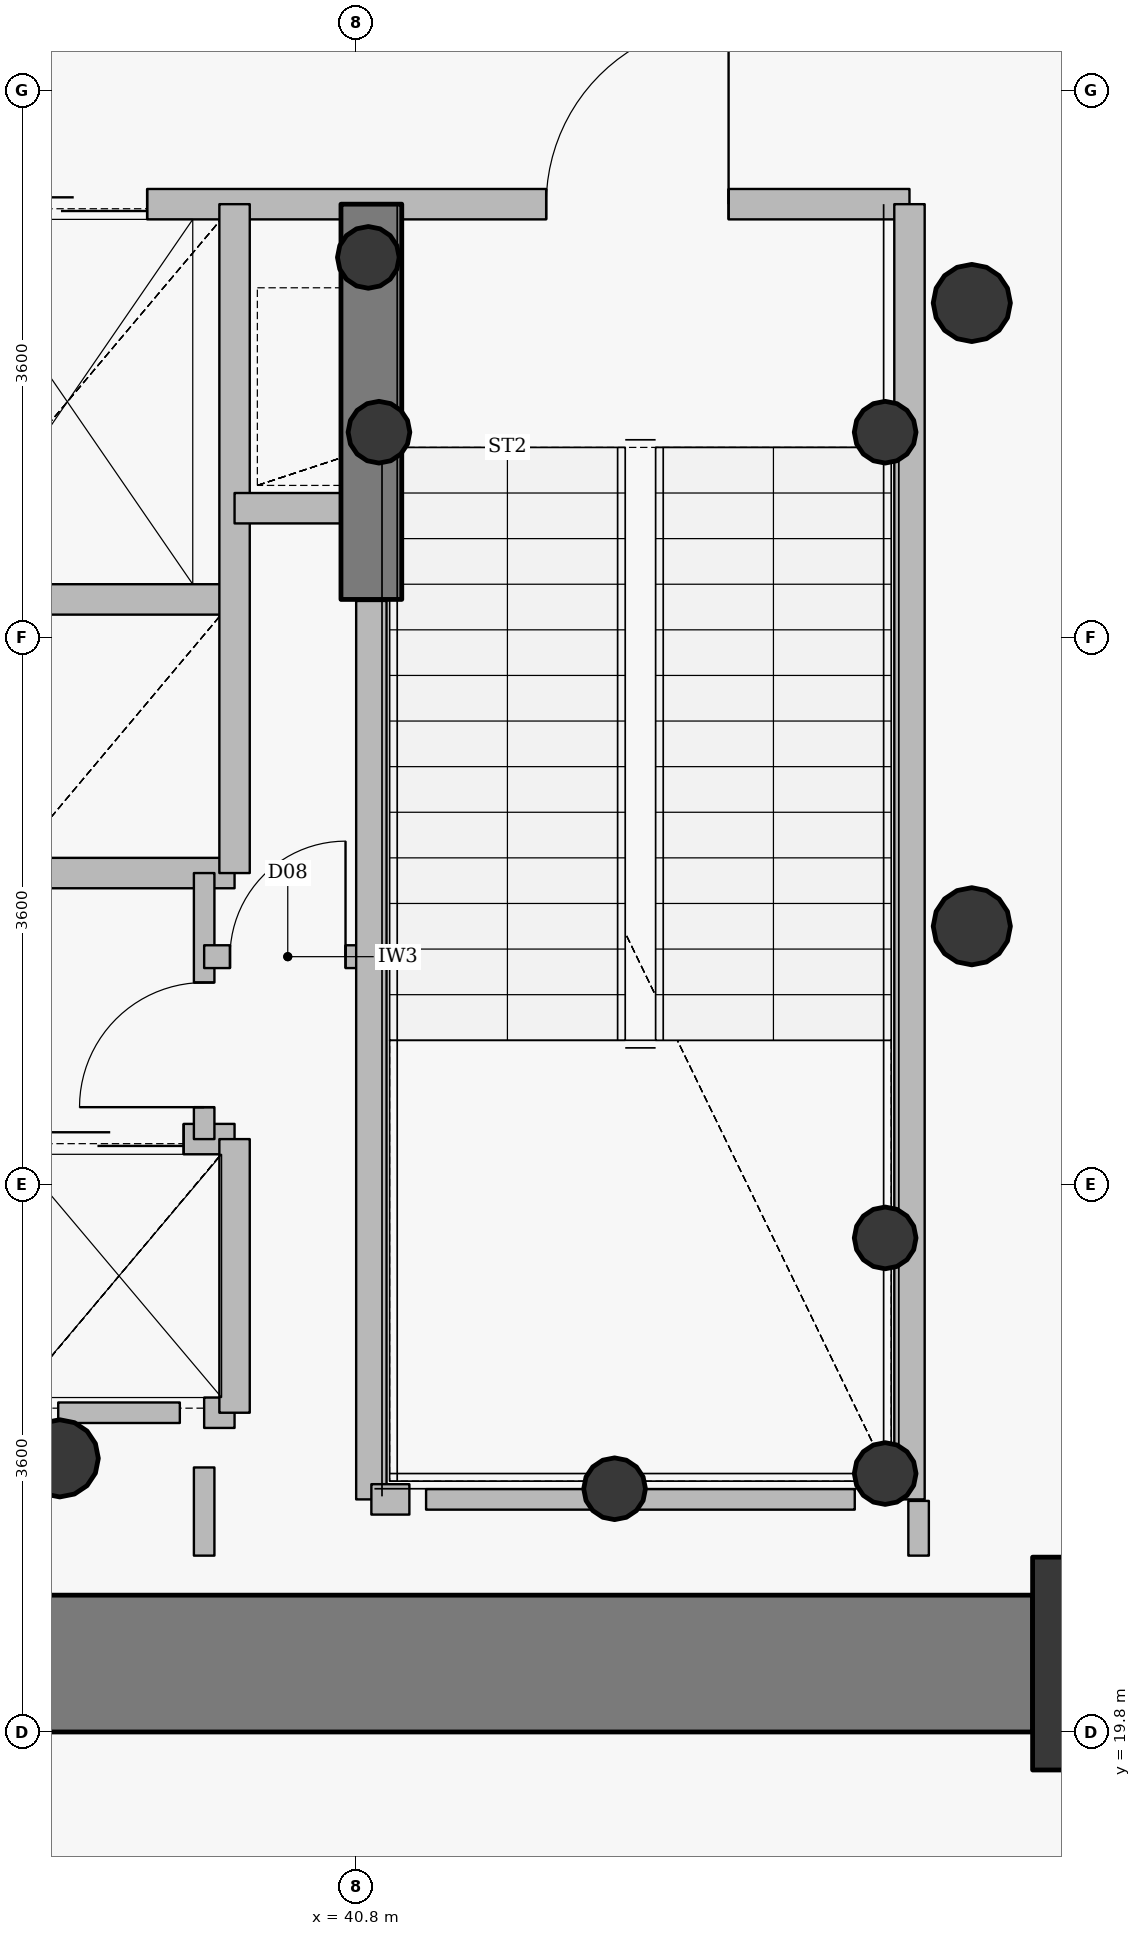
"""IFC4 building model, lengths in metres.
Left out: names, types, materials, properties, quantities, classifications, styles, units other than length and angle.
Written with IfcOpenShell. Run it as: python <this file> out.ifc"""

import sys

from ifc_helpers import new_model, si_unit, direction, frame, frame_2d, origin, origin_2d, place, context, subcontext, project, spatial, rectangle, hollow_circle, extrude, source, transform, mapped, element, fill, save


model = new_model("IFC4")
c1 = context("Model", 3, precision=1e-05, world=origin(), true_north=direction((0.0, 1.0)))
c2 = subcontext(c1, "Body", "Model", "MODEL_VIEW")
j1 = project(units=[si_unit("LENGTHUNIT", "METRE"), si_unit("PLANEANGLEUNIT", "RADIAN")], contexts=[c1])
p1 = place(None, origin())
s1 = spatial("IfcSite", under=j1, at=p1, CompositionType="ELEMENT")
p2 = place(p1, origin())
s2 = spatial("IfcBuilding", under=s1, at=p2, CompositionType="ELEMENT")
p3 = place(p2, frame((0.0, 0.0, 66.0)))
s3 = spatial("IfcBuildingStorey", under=s2, at=p3, CompositionType="ELEMENT", Elevation=66.0)
p4 = place(p3, frame((45.95, 20.25, 0.0), z_axis=(0.0, 0.0, 1.0), x_axis=(1.0, 0.0, 0.0)))
e1 = element("IfcColumn", 1, at=p4, inside=s3, PredefinedType="COLUMN", context=c2, shape_type="SweptSolid", body=[
    extrude(rectangle(XDim=1.4, YDim=1.4, at=origin_2d()), origin(), (0.0, 0.0, 1.0), 4.2),
])
p5 = place(p3, frame((38.85, 21.6, 0.0), z_axis=(0.0, 0.0, 1.0), x_axis=(1.0, 0.0, 0.0)))
e2 = element("IfcColumn", 2, at=p5, inside=s3, PredefinedType="COLUMN", context=c2, shape_type="SweptSolid", body=[
    extrude(hollow_circle(Radius=0.254, WallThickness=0.02, at=origin_2d()), origin(), (0.0, 0.0, 1.0), 4.2),
])
for number, where, z_axis, x_axis in (
    (3, (44.28, 21.5, 0.0), (0.0, 0.0, 1.0), (1.0, 0.0, 0.0)),
    (4, (44.28, 23.05, 0.0), (0.0, 0.0, 1.0), (1.0, 0.0, 0.0)),
    (5, (42.5, 21.4, 0.0), (0.0, 0.0, 1.0), (1.0, 0.0, 0.0)),
    (6, (40.95, 28.35, 0.0), (0.0, 0.0, 1.0), (1.0, 0.0, 0.0)),
    (7, (44.28, 28.35, 0.0), (0.0, 0.0, 1.0), (1.0, 0.0, 0.0)),
    (8, (40.88, 29.5, 0.0), (0.0, 0.0, 1.0), (1.0, 0.0, 0.0)),
):
    element("IfcColumn", number, at=place(p3, frame(where, z_axis=z_axis, x_axis=x_axis)), inside=s3, PredefinedType="COLUMN", context=c2, shape_type="SweptSolid", body=[
        extrude(hollow_circle(Radius=0.203, WallThickness=0.016, at=origin_2d()), origin(), (0.0, 0.0, 1.0), 4.2),
    ])
p6 = place(p3, frame((45.25, 20.25, 0.0), z_axis=(0.0, 0.0, 1.0), x_axis=(-1.0, 0.0, 0.0)))
e9 = element("IfcWall", 9, at=p6, inside=s3, PredefinedType="SHEAR", context=c2, shape_type="SweptSolid", body=[
    extrude(rectangle(XDim=18.5, YDim=0.9, at=frame_2d((9.25, 0.0))), origin(), (0.0, 0.0, 1.0), 3.4),
])
p7 = place(p6, frame((10.0, 0.0, 0.0)))
e10 = element("IfcOpeningElement", 10, at=p7, cuts=e9, PredefinedType="OPENING", context=c2, shape_type="SweptSolid", body=[
    extrude(rectangle(XDim=1.15, YDim=2.15, at=origin_2d()), frame((0.575, 0.46, 1.075), z_axis=(0.0, -1.0, 0.0), x_axis=(1.0, 0.0, 0.0)), (0.0, 0.0, 1.0), 0.92),
])
p8 = place(p3, frame((40.9, 27.25, 0.0), z_axis=(0.0, 0.0, 1.0), x_axis=(0.0, 1.0, 0.0)))
e11 = element("IfcWall", 11, at=p8, inside=s3, PredefinedType="SHEAR", context=c2, shape_type="SweptSolid", body=[
    extrude(rectangle(XDim=2.6, YDim=0.4, at=frame_2d((1.3, 0.0))), origin(), (0.0, 0.0, 1.0), 3.55),
])
for number, where, z_axis, x_axis in (
    (12, (44.85, 25.1, 0.0), (0.0, 0.0, 1.0), (1.0, 0.0, 0.0)),
    (13, (44.85, 29.2, 0.0), (0.0, 0.0, 1.0), (1.0, 0.0, 0.0)),
):
    element("IfcColumn", number, at=place(p3, frame(where, z_axis=z_axis, x_axis=x_axis)), inside=s3, PredefinedType="COLUMN", context=c2, shape_type="SweptSolid", body=[
        extrude(hollow_circle(Radius=0.254, WallThickness=0.02, at=origin_2d()), origin(), (0.0, 0.0, 1.0), 4.2),
    ])
p9 = place(p3, frame((35.05, 27.25, 0.0), z_axis=(0.0, 0.0, 1.0), x_axis=(1.0, 0.0, 0.0)))
e14 = element("IfcWall", 14, at=p9, inside=s3, PredefinedType="PARTITIONING", context=c2, shape_type="SweptSolid", body=[
    extrude(rectangle(XDim=4.95, YDim=0.2, at=frame_2d((2.475, 0.0))), origin(), (0.0, 0.0, 1.0), 3.535),
])
p10 = place(p3, frame((35.45, 23.7, 0.0), z_axis=(0.0, 0.0, 1.0), x_axis=(1.0, 0.0, 0.0)))
e15 = element("IfcWall", 15, at=p10, inside=s3, PredefinedType="PARTITIONING", context=c2, shape_type="SweptSolid", body=[
    extrude(rectangle(XDim=4.55, YDim=0.2, at=frame_2d((2.275, 0.0))), origin(), (0.0, 0.0, 1.0), 3.535),
])
p11 = place(p10, frame((0.25, 0.0, 0.0)))
e16 = element("IfcOpeningElement", 16, at=p11, cuts=e15, PredefinedType="OPENING", context=c2, shape_type="SweptSolid", body=[
    extrude(rectangle(XDim=1.05, YDim=2.15, at=origin_2d()), frame((0.525, 0.11, 1.075), z_axis=(0.0, -1.0, 0.0), x_axis=(1.0, 0.0, 0.0)), (0.0, 0.0, 1.0), 0.22),
])
p12 = place(p10, frame((1.745, 0.0, 0.0)))
e17 = element("IfcOpeningElement", 17, at=p12, cuts=e15, PredefinedType="OPENING", context=c2, shape_type="SweptSolid", body=[
    extrude(rectangle(XDim=1.05, YDim=2.15, at=origin_2d()), frame((0.525, 0.11, 1.075), z_axis=(0.0, -1.0, 0.0), x_axis=(1.0, 0.0, 0.0)), (0.0, 0.0, 1.0), 0.22),
])
p13 = place(p10, frame((3.165, 0.0, 0.0)))
e18 = element("IfcOpeningElement", 18, at=p13, cuts=e15, PredefinedType="OPENING", context=c2, shape_type="SweptSolid", body=[
    extrude(rectangle(XDim=1.05, YDim=2.15, at=origin_2d()), frame((0.525, 0.11, 1.075), z_axis=(0.0, -1.0, 0.0), x_axis=(1.0, 0.0, 0.0)), (0.0, 0.0, 1.0), 0.22),
])
p14 = place(p3, frame((35.45, 25.45, 0.0), z_axis=(0.0, 0.0, 1.0), x_axis=(1.0, 0.0, 0.0)))
e19 = element("IfcWall", 19, at=p14, inside=s3, PredefinedType="PARTITIONING", context=c2, shape_type="SweptSolid", body=[
    extrude(rectangle(XDim=4.55, YDim=0.2, at=frame_2d((2.275, 0.0))), origin(), (0.0, 0.0, 1.0), 3.535),
])
p15 = place(p3, frame((35.95, 29.85, 0.0), z_axis=(0.0, 0.0, 1.0), x_axis=(1.0, 0.0, 0.0)))
e20 = element("IfcWall", 20, at=p15, inside=s3, PredefinedType="PARTITIONING", context=c2, shape_type="SweptSolid", body=[
    extrude(rectangle(XDim=8.49, YDim=0.2, at=frame_2d((4.245, 0.0))), origin(), (0.0, 0.0, 1.0), 3.535),
])
p16 = place(p15, frame((6.1, 0.0, 0.0)))
e21 = element("IfcOpeningElement", 21, at=p16, cuts=e20, PredefinedType="OPENING", context=c2, shape_type="SweptSolid", body=[
    extrude(rectangle(XDim=1.2, YDim=2.15, at=origin_2d()), frame((0.6, 0.11, 1.075), z_axis=(0.0, -1.0, 0.0), x_axis=(1.0, 0.0, 0.0)), (0.0, 0.0, 1.0), 0.22),
])
p17 = place(p15, frame((0.37, 0.0, 0.0)))
e22 = element("IfcOpeningElement", 22, at=p17, cuts=e20, PredefinedType="OPENING", context=c2, shape_type="SweptSolid", body=[
    extrude(rectangle(XDim=1.15, YDim=2.15, at=origin_2d()), frame((0.575, 0.11, 1.075), z_axis=(0.0, -1.0, 0.0), x_axis=(1.0, 0.0, 0.0)), (0.0, 0.0, 1.0), 0.22),
])
p18 = place(p15, frame((2.425, 0.0, 0.0)))
e23 = element("IfcOpeningElement", 23, at=p18, cuts=e20, PredefinedType="OPENING", context=c2, shape_type="SweptSolid", body=[
    extrude(rectangle(XDim=1.05, YDim=2.15, at=origin_2d()), frame((0.525, 0.11, 1.075), z_axis=(0.0, -1.0, 0.0), x_axis=(1.0, 0.0, 0.0)), (0.0, 0.0, 1.0), 0.22),
])
p19 = place(p3, frame((39.8, 21.9, 0.0), z_axis=(0.0, 0.0, 1.0), x_axis=(1.0, 0.0, 0.0)))
e24 = element("IfcWall", 24, at=p19, inside=s3, PredefinedType="PARTITIONING", context=c2, shape_type="SweptSolid", body=[
    extrude(rectangle(XDim=0.2, YDim=0.2, at=frame_2d((0.1, 0.0))), origin(), (0.0, 0.0, 1.0), 3.95),
])
p20 = place(p3, frame((39.8, 23.7, 0.0), z_axis=(0.0, 0.0, 1.0), x_axis=(0.0, 1.0, 0.0)))
e25 = element("IfcWall", 25, at=p20, inside=s3, PredefinedType="PARTITIONING", context=c2, shape_type="SweptSolid", body=[
    extrude(rectangle(XDim=1.75, YDim=0.135, at=frame_2d((0.875, 0.0))), origin(), (0.0, 0.0, 1.0), 3.95),
])
p21 = place(p20, frame((0.21, 0.0, 0.0)))
e26 = element("IfcOpeningElement", 26, at=p21, cuts=e25, PredefinedType="OPENING", context=c2, shape_type="SweptSolid", body=[
    extrude(rectangle(XDim=0.82, YDim=2.1, at=origin_2d()), frame((0.41, 0.078, 1.05), z_axis=(0.0, -1.0, 0.0), x_axis=(1.0, 0.0, 0.0)), (0.0, 0.0, 1.0), 0.155),
])
p22 = place(p3, frame((39.8, 24.9, 0.0), z_axis=(0.0, 0.0, 1.0), x_axis=(1.0, 0.0, 0.0)))
e27 = element("IfcWall", 27, at=p22, inside=s3, PredefinedType="PARTITIONING", context=c2, shape_type="SweptSolid", body=[
    extrude(rectangle(XDim=1.1, YDim=0.15, at=frame_2d((0.55, 0.0))), origin(), (0.0, 0.0, 1.0), 3.95),
])
p23 = place(p22, frame((0.17, 0.0, 0.0)))
e28 = element("IfcOpeningElement", 28, at=p23, cuts=e27, PredefinedType="OPENING", context=c2, shape_type="SweptSolid", body=[
    extrude(rectangle(XDim=0.76, YDim=2.1, at=origin_2d()), frame((0.38, 0.085, 1.05), z_axis=(0.0, -1.0, 0.0), x_axis=(1.0, 0.0, 0.0)), (0.0, 0.0, 1.0), 0.17),
])
p24 = place(p3, frame((40.0, 21.9, 0.0), z_axis=(0.0, 0.0, 1.0), x_axis=(0.0, 1.0, 0.0)))
e29 = element("IfcWall", 29, at=p24, inside=s3, PredefinedType="PARTITIONING", context=c2, shape_type="SweptSolid", body=[
    extrude(rectangle(XDim=1.8, YDim=0.2, at=frame_2d((0.9, 0.0))), origin(), (0.0, 0.0, 1.0), 3.95),
])
p25 = place(p3, frame((40.0, 25.45, 0.0), z_axis=(0.0, 0.0, 1.0), x_axis=(0.0, 1.0, 0.0)))
e30 = element("IfcWall", 30, at=p25, inside=s3, PredefinedType="PARTITIONING", context=c2, shape_type="SweptSolid", body=[
    extrude(rectangle(XDim=4.4, YDim=0.2, at=frame_2d((2.2, 0.0))), origin(), (0.0, 0.0, 1.0), 3.95),
])
p26 = place(p3, frame((40.0, 27.85, 0.0), z_axis=(0.0, 0.0, 1.0), x_axis=(1.0, 0.0, 0.0)))
e31 = element("IfcWall", 31, at=p26, inside=s3, PredefinedType="PARTITIONING", context=c2, shape_type="SweptSolid", body=[
    extrude(rectangle(XDim=0.9, YDim=0.2, at=frame_2d((0.45, 0.0))), origin(), (0.0, 0.0, 1.0), 3.95),
])
p27 = place(p3, frame((40.9, 21.33, 0.0), z_axis=(0.0, 0.0, 1.0), x_axis=(0.0, 1.0, 0.0)))
e32 = element("IfcWall", 32, at=p27, inside=s3, PredefinedType="PARTITIONING", context=c2, shape_type="SweptSolid", body=[
    extrude(rectangle(XDim=5.91, YDim=0.2, at=frame_2d((2.955, 0.0))), origin(), (0.0, 0.0, 1.0), 3.485),
])
p28 = place(p3, frame((40.9, 21.33, 0.0), z_axis=(0.0, 0.0, 1.0), x_axis=(1.0, 0.0, 0.0)))
e33 = element("IfcWall", 33, at=p28, inside=s3, PredefinedType="PARTITIONING", context=c2, shape_type="SweptSolid", body=[
    extrude(rectangle(XDim=0.25, YDim=0.2, at=frame_2d((0.125, 0.0))), origin(), (0.0, 0.0, 1.0), 3.485),
])
p29 = place(p3, frame((44.44, 21.33, 0.0), z_axis=(0.0, 0.0, 1.0), x_axis=(0.0, 1.0, 0.0)))
e34 = element("IfcWall", 34, at=p29, inside=s3, PredefinedType="PARTITIONING", context=c2, shape_type="SweptSolid", body=[
    extrude(rectangle(XDim=8.52, YDim=0.2, at=frame_2d((4.26, 0.0))), origin(), (0.0, 0.0, 1.0), 3.95),
])
p30 = place(p3, frame((44.08, 21.33, 0.0), z_axis=(0.0, 0.0, 1.0), x_axis=(-1.0, 0.0, 0.0)))
e35 = element("IfcWall", 35, at=p30, inside=s3, PredefinedType="PARTITIONING", context=c2, shape_type="SweptSolid", body=[
    extrude(rectangle(XDim=2.82, YDim=0.135, at=frame_2d((1.41, 0.0))), origin(), (0.0, 0.0, 1.0), 3.485),
])
p31 = place(p3, frame((39.64, 21.9, 0.0), z_axis=(0.0, 0.0, 1.0), x_axis=(-1.0, 0.0, 0.0)))
e36 = element("IfcWall", 36, at=p31, inside=s3, PredefinedType="PARTITIONING", context=c2, shape_type="SweptSolid", body=[
    extrude(rectangle(XDim=0.8, YDim=0.135, at=frame_2d((0.4, 0.0))), origin(), (0.0, 0.0, 1.0), 3.535),
])
p32 = place(p3, frame((39.8, 20.96, 0.0), z_axis=(0.0, 0.0, 1.0), x_axis=(0.0, 1.0, 0.0)))
e37 = element("IfcWall", 37, at=p32, inside=s3, PredefinedType="PARTITIONING", context=c2, shape_type="SweptSolid", body=[
    extrude(rectangle(XDim=0.58, YDim=0.135, at=frame_2d((0.29, 0.0))), origin(), (0.0, 0.0, 1.0), 3.485),
])
p33 = place(p3, frame((44.5, 20.96, 0.0), z_axis=(0.0, 0.0, 1.0), x_axis=(0.0, 1.0, 0.0)))
e38 = element("IfcWall", 38, at=p33, inside=s3, PredefinedType="PARTITIONING", context=c2, shape_type="SweptSolid", body=[
    extrude(rectangle(XDim=0.36, YDim=0.135, at=frame_2d((0.18, 0.0))), origin(), (0.0, 0.0, 1.0), 3.95),
])
p34 = place(p3, frame((45.26, 19.8, 0.0), z_axis=(0.0, 0.0, 1.0), x_axis=(1.0, 0.0, 0.0)))
e39 = element("IfcWall", 39, at=p34, inside=s3, PredefinedType="PARTITIONING", context=c2, shape_type="SweptSolid", body=[
    extrude(rectangle(XDim=1.14, YDim=0.135, at=frame_2d((0.57, 0.0))), origin(), (0.0, 0.0, 1.0), 3.285),
])
m1 = source(origin(), c2, "Body", "SweptSolid", [
    extrude(rectangle(XDim=1.2, YDim=2.15, at=origin_2d()), frame((0.6, 0.025, 1.075), z_axis=(0.0, -1.0, 0.0), x_axis=(1.0, 0.0, 0.0)), (0.0, 0.0, 1.0), 0.05),
])
p35 = place(p16, origin())
e40 = element("IfcDoor", 40, at=p35, inside=s3, OperationType="SINGLE_SWING_RIGHT", PredefinedType="DOOR", context=c2, shape_type="MappedRepresentation", body=[
    mapped(m1, transform((0.0, 0.0, 0.0), x_axis=(1.0, 0.0, 0.0), y_axis=(0.0, 1.0, 0.0), z_axis=(0.0, 0.0, 1.0), scale=1.0)),
])
fill(e21, e40)
m2 = source(origin(), c2, "Body", "SweptSolid", [
    extrude(rectangle(XDim=1.05, YDim=2.15, at=origin_2d()), frame((0.525, 0.025, 1.075), z_axis=(0.0, -1.0, 0.0), x_axis=(1.0, 0.0, 0.0)), (0.0, 0.0, 1.0), 0.05),
])
p36 = place(p18, origin())
e41 = element("IfcDoor", 41, at=p36, inside=s3, OperationType="DOUBLE_DOOR_SLIDING", PredefinedType="USERDEFINED", context=c2, shape_type="MappedRepresentation", body=[
    mapped(m2, transform((0.0, 0.0, 0.0), x_axis=(1.0, 0.0, 0.0), y_axis=(0.0, 1.0, 0.0), z_axis=(0.0, 0.0, 1.0), scale=1.0)),
])
fill(e23, e41)
p37 = place(p13, origin())
e42 = element("IfcDoor", 42, at=p37, inside=s3, OperationType="DOUBLE_DOOR_SLIDING", PredefinedType="USERDEFINED", context=c2, shape_type="MappedRepresentation", body=[
    mapped(m2, transform((0.0, 0.0, 0.0), x_axis=(1.0, 0.0, 0.0), y_axis=(0.0, 1.0, 0.0), z_axis=(0.0, 0.0, 1.0), scale=1.0)),
])
fill(e18, e42)
m3 = source(origin(), c2, "Body", "SweptSolid", [
    extrude(rectangle(XDim=0.82, YDim=2.1, at=origin_2d()), frame((0.41, 0.025, 1.05), z_axis=(0.0, -1.0, 0.0), x_axis=(1.0, 0.0, 0.0)), (0.0, 0.0, 1.0), 0.05),
])
p38 = place(p21, origin())
e43 = element("IfcDoor", 43, at=p38, inside=s3, OperationType="SINGLE_SWING_LEFT", PredefinedType="DOOR", context=c2, shape_type="MappedRepresentation", body=[
    mapped(m3, transform((0.0, 0.0, 0.0), x_axis=(1.0, 0.0, 0.0), y_axis=(0.0, 1.0, 0.0), z_axis=(0.0, 0.0, 1.0), scale=1.0)),
])
fill(e26, e43)
m4 = source(origin(), c2, "Body", "SweptSolid", [
    extrude(rectangle(XDim=0.76, YDim=2.1, at=origin_2d()), frame((0.38, 0.025, 1.05), z_axis=(0.0, -1.0, 0.0), x_axis=(1.0, 0.0, 0.0)), (0.0, 0.0, 1.0), 0.05),
])
p39 = place(p23, origin())
e44 = element("IfcDoor", 44, at=p39, inside=s3, OperationType="SINGLE_SWING_RIGHT", PredefinedType="DOOR", context=c2, shape_type="MappedRepresentation", body=[
    mapped(m4, transform((0.0, 0.0, 0.0), x_axis=(1.0, 0.0, 0.0), y_axis=(0.0, 1.0, 0.0), z_axis=(0.0, 0.0, 1.0), scale=1.0)),
])
fill(e28, e44)
save(model, sys.argv[1])
